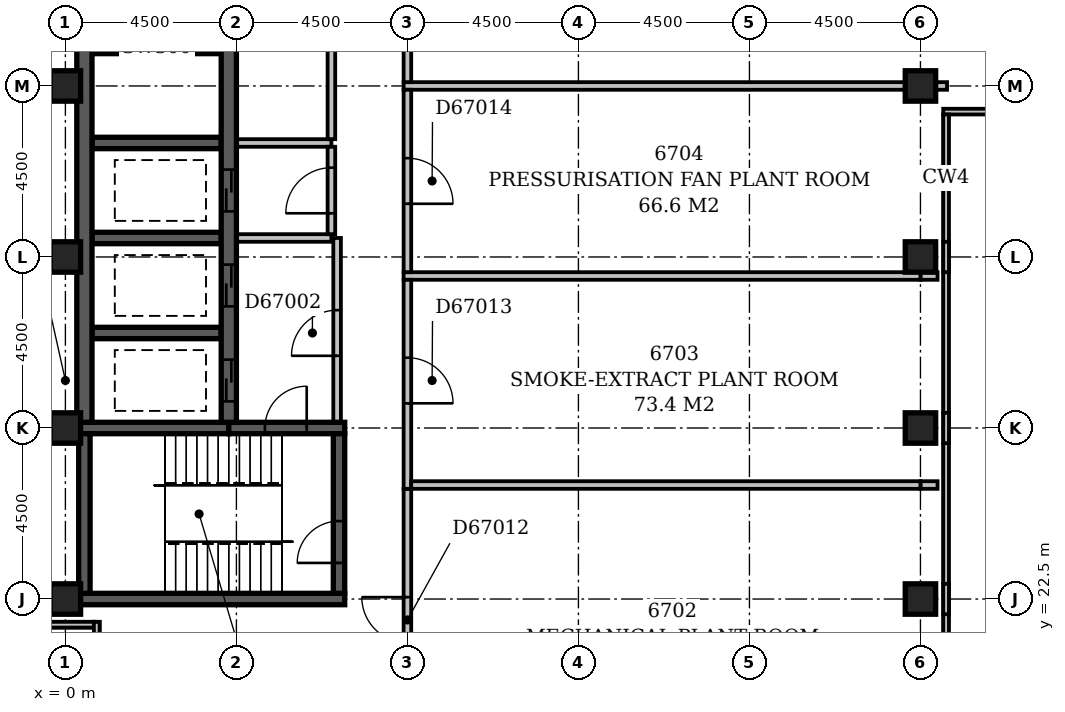
"""IFC4 building model, lengths in metres.
Left out: names, types, materials, properties, quantities, classifications, styles, units other than length and angle.
Written with IfcOpenShell. Run it as: python <this file> out.ifc"""

import sys

from ifc_helpers import new_model, si_unit, direction, frame, frame_2d, origin, origin_2d, place, context, subcontext, project, spatial, rectangle, extrude, element, fill, save


model = new_model("IFC4")
c1 = context("Model", 3, precision=1e-05, world=origin(), true_north=direction((0.0, 1.0)))
c2 = subcontext(c1, "Body", "Model", "MODEL_VIEW")
j1 = project(units=[si_unit("LENGTHUNIT", "METRE"), si_unit("PLANEANGLEUNIT", "RADIAN")], contexts=[c1])
p1 = place(None, origin())
s1 = spatial("IfcSite", under=j1, at=p1, CompositionType="ELEMENT")
p2 = place(p1, origin())
s2 = spatial("IfcBuilding", under=s1, at=p2, CompositionType="ELEMENT")
p3 = place(p2, frame((0.0, 0.0, 258.2)))
s3 = spatial("IfcBuildingStorey", under=s2, at=p3, CompositionType="ELEMENT", Elevation=258.2)
p4 = place(p3, frame((0.35, 22.5, -0.45), z_axis=(0.0, 0.0, 1.0), x_axis=(1.0, 0.0, 0.0)))
e1 = element("IfcWall", 1, at=p4, inside=s3, PredefinedType="SHEAR", context=c2, shape_type="SweptSolid", body=[
    extrude(rectangle(XDim=7.0, YDim=0.3, at=frame_2d((3.5, 0.0))), origin(), (0.0, 0.0, 1.0), 8.05),
])
p5 = place(p3, frame((0.35, 27.0, -0.45), z_axis=(0.0, 0.0, 1.0), x_axis=(1.0, 0.0, 0.0)))
e2 = element("IfcWall", 2, at=p5, inside=s3, PredefinedType="SHEAR", context=c2, shape_type="SweptSolid", body=[
    extrude(rectangle(XDim=3.95, YDim=0.3, at=frame_2d((1.975, 0.0))), origin(), (0.0, 0.0, 1.0), 8.05),
])
p6 = place(p3, frame((0.5, 22.65, -0.45), z_axis=(0.0, 0.0, 1.0), x_axis=(0.0, 1.0, 0.0)))
e3 = element("IfcWall", 3, at=p6, inside=s3, PredefinedType="SHEAR", context=c2, shape_type="SweptSolid", body=[
    extrude(rectangle(XDim=4.2, YDim=0.3, at=frame_2d((2.1, 0.0))), origin(), (0.0, 0.0, 1.0), 8.05),
])
p7 = place(p3, frame((0.5, 27.15, -0.45), z_axis=(0.0, 0.0, 1.0), x_axis=(0.0, 1.0, 0.0)))
e4 = element("IfcWall", 4, at=p7, inside=s3, PredefinedType="SHEAR", context=c2, shape_type="SweptSolid", body=[
    extrude(rectangle(XDim=22.15, YDim=0.4, at=frame_2d((11.075, 0.0))), origin(), (0.0, 0.0, 1.0), 8.05),
])
for number, where, z_axis, x_axis in (
    (5, (0.7, 29.5, -0.45), (0.0, 0.0, 1.0), (1.0, 0.0, 0.0)),
    (6, (0.7, 32.0, -0.45), (0.0, 0.0, 1.0), (1.0, 0.0, 0.0)),
    (7, (0.7, 34.5, -0.45), (0.0, 0.0, 1.0), (1.0, 0.0, 0.0)),
    (8, (0.7, 37.0, -0.45), (0.0, 0.0, 1.0), (1.0, 0.0, 0.0)),
):
    element("IfcWall", number, at=place(p3, frame(where, z_axis=z_axis, x_axis=x_axis)), inside=s3, PredefinedType="SHEAR", context=c2, shape_type="SweptSolid", body=[
        extrude(rectangle(XDim=3.4, YDim=0.3, at=frame_2d((1.7, 0.0))), origin(), (0.0, 0.0, 1.0), 8.05),
    ])
p8 = place(p3, frame((4.3, 27.0, -0.45), z_axis=(0.0, 0.0, 1.0), x_axis=(1.0, 0.0, 0.0)))
e9 = element("IfcWall", 9, at=p8, inside=s3, PredefinedType="SHEAR", context=c2, shape_type="SweptSolid", body=[
    extrude(rectangle(XDim=3.05, YDim=0.3, at=frame_2d((1.525, 0.0))), origin(), (0.0, 0.0, 1.0), 8.05),
])
p9 = place(p8, frame((0.95, 0.0, 0.45)))
e10 = element("IfcOpeningElement", 10, at=p9, cuts=e9, PredefinedType="OPENING", context=c2, shape_type="SweptSolid", body=[
    extrude(rectangle(XDim=1.1, YDim=2.1, at=frame_2d((0.55, 1.05))), frame((0.0, 0.162, 0.0), z_axis=(0.0, -1.0, 0.0), x_axis=(1.0, 0.0, 0.0)), (0.0, 0.0, 1.0), 0.324),
])
p10 = place(p3, frame((4.3, 27.15, -0.45), z_axis=(0.0, 0.0, 1.0), x_axis=(0.0, 1.0, 0.0)))
e11 = element("IfcWall", 11, at=p10, inside=s3, PredefinedType="SHEAR", context=c2, shape_type="SweptSolid", body=[
    extrude(rectangle(XDim=22.15, YDim=0.4, at=frame_2d((11.075, 0.0))), origin(), (0.0, 0.0, 1.0), 8.05),
])
p11 = place(p10, frame((3.05, 0.0, 0.45)))
e12 = element("IfcOpeningElement", 12, at=p11, cuts=e11, PredefinedType="OPENING", context=c2, shape_type="SweptSolid", body=[
    extrude(rectangle(XDim=1.1, YDim=2.1, at=frame_2d((0.55, 1.05))), frame((0.0, 0.212, 0.0), z_axis=(0.0, -1.0, 0.0), x_axis=(1.0, 0.0, 0.0)), (0.0, 0.0, 1.0), 0.424),
])
p12 = place(p10, frame((0.55, 0.0, 0.45)))
e13 = element("IfcOpeningElement", 13, at=p12, cuts=e11, PredefinedType="OPENING", context=c2, shape_type="SweptSolid", body=[
    extrude(rectangle(XDim=1.1, YDim=2.1, at=frame_2d((0.55, 1.05))), frame((0.0, 0.212, 0.0), z_axis=(0.0, -1.0, 0.0), x_axis=(1.0, 0.0, 0.0)), (0.0, 0.0, 1.0), 0.424),
])
p13 = place(p10, frame((5.55, 0.0, 0.45)))
e14 = element("IfcOpeningElement", 14, at=p13, cuts=e11, PredefinedType="OPENING", context=c2, shape_type="SweptSolid", body=[
    extrude(rectangle(XDim=1.1, YDim=2.1, at=frame_2d((0.55, 1.05))), frame((0.0, 0.212, 0.0), z_axis=(0.0, -1.0, 0.0), x_axis=(1.0, 0.0, 0.0)), (0.0, 0.0, 1.0), 0.424),
])
p14 = place(p3, frame((7.2, 22.65, -0.45), z_axis=(0.0, 0.0, 1.0), x_axis=(0.0, 1.0, 0.0)))
e15 = element("IfcWall", 15, at=p14, inside=s3, PredefinedType="SHEAR", context=c2, shape_type="SweptSolid", body=[
    extrude(rectangle(XDim=4.2, YDim=0.3, at=frame_2d((2.1, 0.0))), origin(), (0.0, 0.0, 1.0), 8.05),
])
p15 = place(p14, frame((0.8, 0.0, 0.45)))
e16 = element("IfcOpeningElement", 16, at=p15, cuts=e15, PredefinedType="OPENING", context=c2, shape_type="SweptSolid", body=[
    extrude(rectangle(XDim=1.1, YDim=2.1, at=frame_2d((0.55, 1.05))), frame((0.0, 0.162, 0.0), z_axis=(0.0, -1.0, 0.0), x_axis=(1.0, 0.0, 0.0)), (0.0, 0.0, 1.0), 0.324),
])
for number, where, z_axis, x_axis in (
    (17, (0.0, 22.5, -0.45), (0.0, 0.0, 1.0), (1.0, 0.0, 0.0)),
    (18, (22.5, 22.5, -0.45), (0.0, 0.0, 1.0), (1.0, 0.0, 0.0)),
    (19, (0.0, 27.0, -0.45), (0.0, 0.0, 1.0), (1.0, 0.0, 0.0)),
    (20, (22.5, 27.0, -0.45), (0.0, 0.0, 1.0), (1.0, 0.0, 0.0)),
    (21, (0.0, 31.5, -0.45), (0.0, 0.0, 1.0), (1.0, 0.0, 0.0)),
    (22, (22.5, 31.5, -0.45), (0.0, 0.0, 1.0), (1.0, 0.0, 0.0)),
    (23, (0.0, 36.0, -0.45), (0.0, 0.0, 1.0), (1.0, 0.0, 0.0)),
    (24, (22.5, 36.0, -0.45), (0.0, 0.0, 1.0), (1.0, 0.0, 0.0)),
):
    element("IfcColumn", number, at=place(p3, frame(where, z_axis=z_axis, x_axis=x_axis)), inside=s3, PredefinedType="COLUMN", context=c2, shape_type="SweptSolid", body=[
        extrude(rectangle(XDim=0.8, YDim=0.8, at=origin_2d()), origin(), (0.0, 0.0, 1.0), 8.05),
    ])
p16 = place(p3, frame((-0.6, 21.825, 0.0), z_axis=(0.0, 0.0, 1.0), x_axis=(1.0, 0.0, 0.0)))
e25 = element("IfcWall", 25, at=p16, inside=s3, PredefinedType="STANDARD", context=c2, shape_type="SweptSolid", body=[
    extrude(rectangle(XDim=1.35, YDim=0.15, at=frame_2d((0.675, 0.0))), origin(), (0.0, 0.0, 1.0), 1.1),
])
p17 = place(p3, frame((0.825, 21.9, 0.0), z_axis=(0.0, 0.0, 1.0), x_axis=(0.0, -1.0, 0.0)))
e26 = element("IfcWall", 26, at=p17, inside=s3, PredefinedType="STANDARD", context=c2, shape_type="SweptSolid", body=[
    extrude(rectangle(XDim=1.65, YDim=0.15, at=frame_2d((0.825, 0.0))), origin(), (0.0, 0.0, 1.0), 1.1),
])
p18 = place(p3, frame((23.175, 17.4, 0.0), z_axis=(0.0, 0.0, 1.0), x_axis=(0.0, 1.0, 0.0)))
e27 = element("IfcWall", 27, at=p18, inside=s3, PredefinedType="STANDARD", context=c2, shape_type="SweptSolid", body=[
    extrude(rectangle(XDim=17.85, YDim=0.15, at=frame_2d((8.925, 0.0))), origin(), (0.0, 0.0, 1.0), 1.1),
])
p19 = place(p3, frame((23.1, 35.325, 0.0), z_axis=(0.0, 0.0, 1.0), x_axis=(1.0, 0.0, 0.0)))
e28 = element("IfcWall", 28, at=p19, inside=s3, PredefinedType="STANDARD", context=c2, shape_type="SweptSolid", body=[
    extrude(rectangle(XDim=18.15, YDim=0.15, at=frame_2d((9.075, 0.0))), origin(), (0.0, 0.0, 1.0), 1.1),
])
p20 = place(p3, frame((-0.6, 21.825, 1.1), z_axis=(0.0, 0.0, 1.0), x_axis=(1.0, 0.0, 0.0)))
e29 = element("IfcWall", 29, at=p20, inside=s3, PredefinedType="STANDARD", context=c2, shape_type="SweptSolid", body=[
    extrude(rectangle(XDim=1.35, YDim=0.15, at=frame_2d((0.675, 0.0))), origin(), (0.0, 0.0, 1.0), 6.0),
])
p21 = place(p3, frame((0.825, 21.9, 1.1), z_axis=(0.0, 0.0, 1.0), x_axis=(0.0, -1.0, 0.0)))
e30 = element("IfcWall", 30, at=p21, inside=s3, PredefinedType="STANDARD", context=c2, shape_type="SweptSolid", body=[
    extrude(rectangle(XDim=1.65, YDim=0.15, at=frame_2d((0.825, 0.0))), origin(), (0.0, 0.0, 1.0), 6.0),
])
for number, where, z_axis, x_axis in (
    (31, (23.175, 22.1, 1.1), (0.0, 0.0, 1.0), (0.0, 1.0, 0.0)),
    (32, (23.175, 26.6, 1.1), (0.0, 0.0, 1.0), (0.0, 1.0, 0.0)),
    (33, (23.175, 31.1, 1.1), (0.0, 0.0, 1.0), (0.0, 1.0, 0.0)),
):
    element("IfcWall", number, at=place(p3, frame(where, z_axis=z_axis, x_axis=x_axis)), inside=s3, PredefinedType="STANDARD", context=c2, shape_type="SweptSolid", body=[
        extrude(rectangle(XDim=0.8, YDim=0.15, at=frame_2d((0.4, 0.0))), origin(), (0.0, 0.0, 1.0), 6.0),
    ])
p22 = place(p3, frame((4.52, 34.5, 0.0), z_axis=(0.0, 0.0, 1.0), x_axis=(1.0, 0.0, 0.0)))
e34 = element("IfcWall", 34, at=p22, inside=s3, PredefinedType="PARTITIONING", context=c2, shape_type="SweptSolid", body=[
    extrude(rectangle(XDim=2.48, YDim=0.2, at=frame_2d((1.24, 0.0))), origin(), (0.0, 0.0, 1.0), 7.6),
])
p23 = place(p3, frame((7.0, 34.6, 0.0), z_axis=(0.0, 0.0, 1.0), x_axis=(0.0, 1.0, 0.0)))
e35 = element("IfcWall", 35, at=p23, inside=s3, PredefinedType="PARTITIONING", context=c2, shape_type="SweptSolid", body=[
    extrude(rectangle(XDim=14.9, YDim=0.2, at=frame_2d((7.45, 0.0))), origin(), (0.0, 0.0, 1.0), 7.6),
])
p24 = place(p23, frame((2.8, 0.0, 0.0)))
e36 = element("IfcOpeningElement", 36, at=p24, cuts=e35, PredefinedType="OPENING", context=c2, shape_type="SweptSolid", body=[
    extrude(rectangle(XDim=1.2, YDim=2.1, at=frame_2d((0.6, 1.05))), frame((0.0, 0.112, 0.0), z_axis=(0.0, -1.0, 0.0), x_axis=(1.0, 0.0, 0.0)), (0.0, 0.0, 1.0), 0.224),
])
p25 = place(p23, frame((9.8, 0.0, 0.0)))
e37 = element("IfcOpeningElement", 37, at=p25, cuts=e35, PredefinedType="OPENING", context=c2, shape_type="SweptSolid", body=[
    extrude(rectangle(XDim=1.2, YDim=2.1, at=frame_2d((0.6, 1.05))), frame((0.0, 0.112, 0.0), z_axis=(0.0, -1.0, 0.0), x_axis=(1.0, 0.0, 0.0)), (0.0, 0.0, 1.0), 0.224),
])
p26 = place(p3, frame((4.52, 32.0, 0.0), z_axis=(0.0, 0.0, 1.0), x_axis=(1.0, 0.0, 0.0)))
e38 = element("IfcWall", 38, at=p26, inside=s3, PredefinedType="PARTITIONING", context=c2, shape_type="SweptSolid", body=[
    extrude(rectangle(XDim=2.48, YDim=0.2, at=frame_2d((1.24, 0.0))), origin(), (0.0, 0.0, 1.0), 7.6),
])
p27 = place(p3, frame((7.0, 32.1, 0.0), z_axis=(0.0, 0.0, 1.0), x_axis=(0.0, 1.0, 0.0)))
e39 = element("IfcWall", 39, at=p27, inside=s3, PredefinedType="PARTITIONING", context=c2, shape_type="SweptSolid", body=[
    extrude(rectangle(XDim=2.3, YDim=0.2, at=frame_2d((1.15, 0.0))), origin(), (0.0, 0.0, 1.0), 7.6),
])
p28 = place(p27, frame((0.55, 0.0, 0.0)))
e40 = element("IfcOpeningElement", 40, at=p28, cuts=e39, PredefinedType="OPENING", context=c2, shape_type="SweptSolid", body=[
    extrude(rectangle(XDim=1.2, YDim=2.1, at=frame_2d((0.6, 1.05))), frame((0.0, 0.112, 0.0), z_axis=(0.0, -1.0, 0.0), x_axis=(1.0, 0.0, 0.0)), (0.0, 0.0, 1.0), 0.224),
])
p29 = place(p3, frame((7.15, 27.17, 0.0), z_axis=(0.0, 0.0, 1.0), x_axis=(0.0, 1.0, 0.0)))
e41 = element("IfcWall", 41, at=p29, inside=s3, PredefinedType="PARTITIONING", context=c2, shape_type="SweptSolid", body=[
    extrude(rectangle(XDim=4.83, YDim=0.2, at=frame_2d((2.415, 0.0))), origin(), (0.0, 0.0, 1.0), 7.6),
])
p30 = place(p29, frame((1.73, 0.0, 0.0)))
e42 = element("IfcOpeningElement", 42, at=p30, cuts=e41, PredefinedType="OPENING", context=c2, shape_type="SweptSolid", body=[
    extrude(rectangle(XDim=1.2, YDim=2.1, at=frame_2d((0.6, 1.05))), frame((0.0, 0.112, 0.0), z_axis=(0.0, -1.0, 0.0), x_axis=(1.0, 0.0, 0.0)), (0.0, 0.0, 1.0), 0.224),
])
p31 = place(p3, frame((9.0, 18.5, 0.0), z_axis=(0.0, 0.0, 1.0), x_axis=(0.0, 1.0, 0.0)))
e43 = element("IfcWall", 43, at=p31, inside=s3, PredefinedType="PARTITIONING", context=c2, shape_type="SweptSolid", body=[
    extrude(rectangle(XDim=6.9, YDim=0.2, at=frame_2d((3.45, 0.0))), origin(), (0.0, 0.0, 1.0), 7.6),
])
p32 = place(p31, frame((2.85, 0.0, 0.0)))
e44 = element("IfcOpeningElement", 44, at=p32, cuts=e43, PredefinedType="OPENING", context=c2, shape_type="SweptSolid", body=[
    extrude(rectangle(XDim=1.2, YDim=2.1, at=frame_2d((0.6, 1.05))), frame((0.0, 0.112, 0.0), z_axis=(0.0, -1.0, 0.0), x_axis=(1.0, 0.0, 0.0)), (0.0, 0.0, 1.0), 0.224),
])
p33 = place(p3, frame((9.1, 25.5, 0.0), z_axis=(0.0, 0.0, 1.0), x_axis=(1.0, 0.0, 0.0)))
e45 = element("IfcWall", 45, at=p33, inside=s3, PredefinedType="PARTITIONING", context=c2, shape_type="SweptSolid", body=[
    extrude(rectangle(XDim=13.4, YDim=0.2, at=frame_2d((6.7, 0.0))), origin(), (0.0, 0.0, 1.0), 7.6),
])
p34 = place(p3, frame((9.0, 25.4, 0.0), z_axis=(0.0, 0.0, 1.0), x_axis=(0.0, 1.0, 0.0)))
e46 = element("IfcWall", 46, at=p34, inside=s3, PredefinedType="PARTITIONING", context=c2, shape_type="SweptSolid", body=[
    extrude(rectangle(XDim=5.5, YDim=0.2, at=frame_2d((2.75, 0.0))), origin(), (0.0, 0.0, 1.0), 7.6),
])
p35 = place(p34, frame((2.25, 0.0, 0.0)))
e47 = element("IfcOpeningElement", 47, at=p35, cuts=e46, PredefinedType="OPENING", context=c2, shape_type="SweptSolid", body=[
    extrude(rectangle(XDim=1.2, YDim=2.1, at=frame_2d((0.6, 1.05))), frame((0.0, 0.112, 0.0), z_axis=(0.0, -1.0, 0.0), x_axis=(1.0, 0.0, 0.0)), (0.0, 0.0, 1.0), 0.224),
])
p36 = place(p3, frame((22.5, 25.5, 0.0), z_axis=(0.0, 0.0, 1.0), x_axis=(1.0, 0.0, 0.0)))
e48 = element("IfcWall", 48, at=p36, inside=s3, PredefinedType="PARTITIONING", context=c2, shape_type="SweptSolid", body=[
    extrude(rectangle(XDim=0.45, YDim=0.2, at=frame_2d((0.225, 0.0))), origin(), (0.0, 0.0, 1.0), 7.6),
])
p37 = place(p3, frame((8.9, 31.0, 0.0), z_axis=(0.0, 0.0, 1.0), x_axis=(1.0, 0.0, 0.0)))
e49 = element("IfcWall", 49, at=p37, inside=s3, PredefinedType="PARTITIONING", context=c2, shape_type="SweptSolid", body=[
    extrude(rectangle(XDim=13.6, YDim=0.2, at=frame_2d((6.8, 0.0))), origin(), (0.0, 0.0, 1.0), 7.6),
])
p38 = place(p3, frame((9.0, 31.1, 0.0), z_axis=(0.0, 0.0, 1.0), x_axis=(0.0, 1.0, 0.0)))
e50 = element("IfcWall", 50, at=p38, inside=s3, PredefinedType="PARTITIONING", context=c2, shape_type="SweptSolid", body=[
    extrude(rectangle(XDim=4.8, YDim=0.2, at=frame_2d((2.4, 0.0))), origin(), (0.0, 0.0, 1.0), 7.6),
])
p39 = place(p38, frame((1.8, 0.0, 0.0)))
e51 = element("IfcOpeningElement", 51, at=p39, cuts=e50, PredefinedType="OPENING", context=c2, shape_type="SweptSolid", body=[
    extrude(rectangle(XDim=1.2, YDim=2.1, at=frame_2d((0.6, 1.05))), frame((0.0, 0.112, 0.0), z_axis=(0.0, -1.0, 0.0), x_axis=(1.0, 0.0, 0.0)), (0.0, 0.0, 1.0), 0.224),
])
p40 = place(p3, frame((22.5, 31.0, 0.0), z_axis=(0.0, 0.0, 1.0), x_axis=(1.0, 0.0, 0.0)))
e52 = element("IfcWall", 52, at=p40, inside=s3, PredefinedType="PARTITIONING", context=c2, shape_type="SweptSolid", body=[
    extrude(rectangle(XDim=0.45, YDim=0.2, at=frame_2d((0.225, 0.0))), origin(), (0.0, 0.0, 1.0), 7.6),
])
p41 = place(p3, frame((9.0, 36.1, 0.0), z_axis=(0.0, 0.0, 1.0), x_axis=(0.0, 1.0, 0.0)))
e53 = element("IfcWall", 53, at=p41, inside=s3, PredefinedType="PARTITIONING", context=c2, shape_type="SweptSolid", body=[
    extrude(rectangle(XDim=13.3, YDim=0.2, at=frame_2d((6.65, 0.0))), origin(), (0.0, 0.0, 1.0), 7.6),
])
p42 = place(p3, frame((22.5, 36.0, 0.0), z_axis=(0.0, 0.0, 1.0), x_axis=(-1.0, 0.0, 0.0)))
e54 = element("IfcWall", 54, at=p42, inside=s3, PredefinedType="PARTITIONING", context=c2, shape_type="SweptSolid", body=[
    extrude(rectangle(XDim=13.6, YDim=0.2, at=frame_2d((6.8, 0.0))), origin(), (0.0, 0.0, 1.0), 7.6),
])
p43 = place(p3, frame((23.2, 36.0, 0.0), z_axis=(0.0, 0.0, 1.0), x_axis=(-1.0, 0.0, 0.0)))
e55 = element("IfcWall", 55, at=p43, inside=s3, PredefinedType="PARTITIONING", context=c2, shape_type="SweptSolid", body=[
    extrude(rectangle(XDim=0.7, YDim=0.2, at=frame_2d((0.35, 0.0))), origin(), (0.0, 0.0, 1.0), 7.1),
])
p44 = place(p30, origin())
e56 = element("IfcDoor", 56, at=p44, inside=s3, OperationType="SINGLE_SWING_LEFT", PredefinedType="DOOR", context=c2, shape_type="SweptSolid", body=[
    extrude(rectangle(XDim=1.2, YDim=2.1, at=frame_2d((0.6, 1.05))), frame((0.0, 0.025, 0.0), z_axis=(0.0, -1.0, 0.0), x_axis=(1.0, 0.0, 0.0)), (0.0, 0.0, 1.0), 0.05),
])
fill(e42, e56)
p45 = place(p11, origin())
e57 = element("IfcDoor", 57, at=p45, inside=s3, OperationType="SLIDING_TO_LEFT", PredefinedType="DOOR", context=c2, shape_type="SweptSolid", body=[
    extrude(rectangle(XDim=1.1, YDim=2.1, at=frame_2d((0.55, 1.05))), frame((0.0, 0.025, 0.0), z_axis=(0.0, -1.0, 0.0), x_axis=(1.0, 0.0, 0.0)), (0.0, 0.0, 1.0), 0.05),
])
fill(e12, e57)
p46 = place(p12, origin())
e58 = element("IfcDoor", 58, at=p46, inside=s3, OperationType="SLIDING_TO_LEFT", PredefinedType="DOOR", context=c2, shape_type="SweptSolid", body=[
    extrude(rectangle(XDim=1.1, YDim=2.1, at=frame_2d((0.55, 1.05))), frame((0.0, 0.025, 0.0), z_axis=(0.0, -1.0, 0.0), x_axis=(1.0, 0.0, 0.0)), (0.0, 0.0, 1.0), 0.05),
])
fill(e13, e58)
p47 = place(p28, origin())
e59 = element("IfcDoor", 59, at=p47, inside=s3, OperationType="SINGLE_SWING_LEFT", PredefinedType="DOOR", context=c2, shape_type="SweptSolid", body=[
    extrude(rectangle(XDim=1.2, YDim=2.1, at=frame_2d((0.6, 1.05))), frame((0.0, 0.025, 0.0), z_axis=(0.0, -1.0, 0.0), x_axis=(1.0, 0.0, 0.0)), (0.0, 0.0, 1.0), 0.05),
])
fill(e40, e59)
p48 = place(p13, origin())
e60 = element("IfcDoor", 60, at=p48, inside=s3, OperationType="SLIDING_TO_LEFT", PredefinedType="DOOR", context=c2, shape_type="SweptSolid", body=[
    extrude(rectangle(XDim=1.1, YDim=2.1, at=frame_2d((0.55, 1.05))), frame((0.0, 0.025, 0.0), z_axis=(0.0, -1.0, 0.0), x_axis=(1.0, 0.0, 0.0)), (0.0, 0.0, 1.0), 0.05),
])
fill(e14, e60)
p49 = place(p9, frame((1.1, 0.0, 0.0), z_axis=(0.0, 0.0, 1.0), x_axis=(-1.0, 0.0, 0.0)))
e61 = element("IfcDoor", 61, at=p49, inside=s3, OperationType="SINGLE_SWING_LEFT", PredefinedType="DOOR", context=c2, shape_type="SweptSolid", body=[
    extrude(rectangle(XDim=1.1, YDim=2.1, at=frame_2d((0.55, 1.05))), frame((0.0, 0.025, 0.0), z_axis=(0.0, -1.0, 0.0), x_axis=(1.0, 0.0, 0.0)), (0.0, 0.0, 1.0), 0.05),
])
fill(e10, e61)
p50 = place(p15, origin())
e62 = element("IfcDoor", 62, at=p50, inside=s3, OperationType="SINGLE_SWING_LEFT", PredefinedType="DOOR", context=c2, shape_type="SweptSolid", body=[
    extrude(rectangle(XDim=1.1, YDim=2.1, at=frame_2d((0.55, 1.05))), frame((0.0, 0.025, 0.0), z_axis=(0.0, -1.0, 0.0), x_axis=(1.0, 0.0, 0.0)), (0.0, 0.0, 1.0), 0.05),
])
fill(e16, e62)
p51 = place(p32, frame((1.2, 0.0, 0.0), z_axis=(0.0, 0.0, 1.0), x_axis=(-1.0, 0.0, 0.0)))
e63 = element("IfcDoor", 63, at=p51, inside=s3, OperationType="SINGLE_SWING_LEFT", PredefinedType="DOOR", context=c2, shape_type="SweptSolid", body=[
    extrude(rectangle(XDim=1.2, YDim=2.1, at=frame_2d((0.6, 1.05))), frame((0.0, 0.025, 0.0), z_axis=(0.0, -1.0, 0.0), x_axis=(1.0, 0.0, 0.0)), (0.0, 0.0, 1.0), 0.05),
])
fill(e44, e63)
p52 = place(p35, frame((1.2, 0.0, 0.0), z_axis=(0.0, 0.0, 1.0), x_axis=(-1.0, 0.0, 0.0)))
e64 = element("IfcDoor", 64, at=p52, inside=s3, OperationType="SINGLE_SWING_RIGHT", PredefinedType="DOOR", context=c2, shape_type="SweptSolid", body=[
    extrude(rectangle(XDim=1.2, YDim=2.1, at=frame_2d((0.6, 1.05))), frame((0.0, 0.025, 0.0), z_axis=(0.0, -1.0, 0.0), x_axis=(1.0, 0.0, 0.0)), (0.0, 0.0, 1.0), 0.05),
])
fill(e47, e64)
p53 = place(p39, frame((1.2, 0.0, 0.0), z_axis=(0.0, 0.0, 1.0), x_axis=(-1.0, 0.0, 0.0)))
e65 = element("IfcDoor", 65, at=p53, inside=s3, OperationType="SINGLE_SWING_RIGHT", PredefinedType="DOOR", context=c2, shape_type="SweptSolid", body=[
    extrude(rectangle(XDim=1.2, YDim=2.1, at=frame_2d((0.6, 1.05))), frame((0.0, 0.025, 0.0), z_axis=(0.0, -1.0, 0.0), x_axis=(1.0, 0.0, 0.0)), (0.0, 0.0, 1.0), 0.05),
])
fill(e51, e65)
save(model, sys.argv[1])
